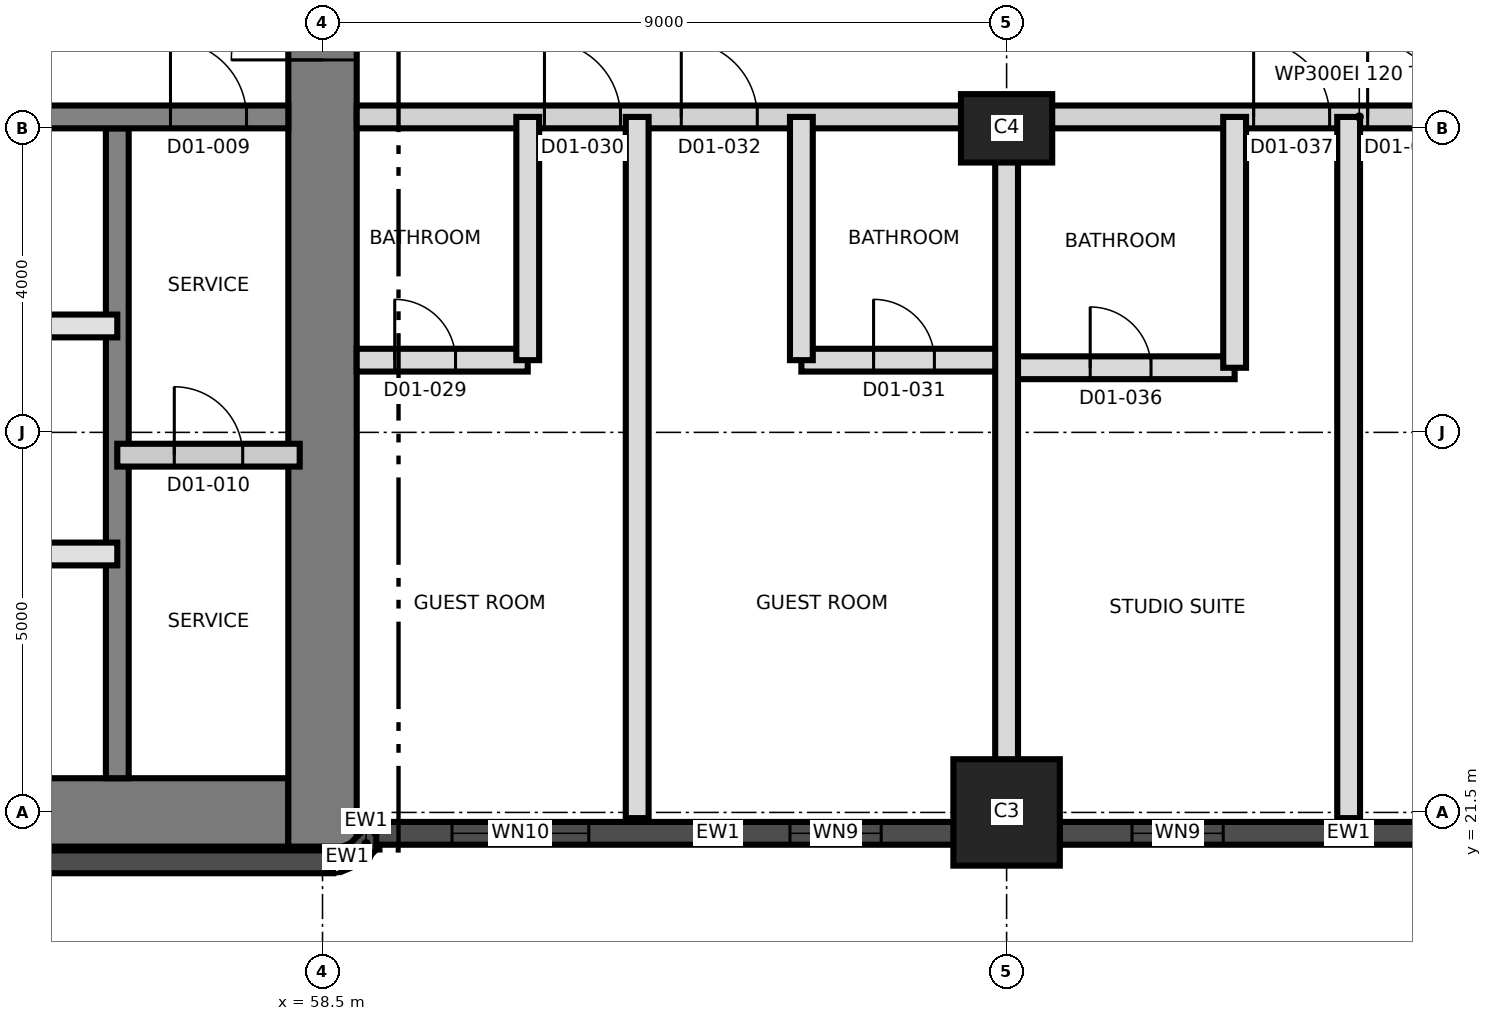
"""IFC4 building model, lengths in metres.
Left out: names, types, materials, properties, quantities, classifications, styles, units other than length and angle.
Written with IfcOpenShell. Run it as: python <this file> out.ifc"""

import sys

from ifc_helpers import new_model, si_unit, direction, frame, frame_2d, origin, origin_2d, place, context, subcontext, project, spatial, rectangle, extrude, element, fill, save


model = new_model("IFC4")
c1 = context("Model", 3, precision=1e-05, world=origin(), true_north=direction((0.0, 1.0)))
c2 = subcontext(c1, "Body", "Model", "MODEL_VIEW")
j1 = project(units=[si_unit("LENGTHUNIT", "METRE"), si_unit("PLANEANGLEUNIT", "RADIAN")], contexts=[c1])
p1 = place(None, origin())
s1 = spatial("IfcSite", under=j1, at=p1, CompositionType="ELEMENT")
p2 = place(p1, origin())
s2 = spatial("IfcBuilding", under=s1, at=p2, CompositionType="ELEMENT")
p3 = place(p2, frame((0.0, 0.0, 40.9)))
s3 = spatial("IfcBuildingStorey", under=s2, at=p3, CompositionType="ELEMENT", Elevation=40.9)
p4 = place(p3, frame((31.05, 21.5, 0.0), z_axis=(0.0, 0.0, 1.0), x_axis=(1.0, 0.0, 0.0)))
e1 = element("IfcWall", 1, at=p4, inside=s3, PredefinedType="SHEAR", context=c2, shape_type="SweptSolid", body=[
    extrude(rectangle(XDim=27.0, YDim=0.9, at=frame_2d((13.5, 0.0))), origin(), (0.0, 0.0, 1.0), 3.7),
])
p5 = place(p3, frame((58.5, 21.05, 0.0), z_axis=(0.0, 0.0, 1.0), x_axis=(0.0, 1.0, 0.0)))
e2 = element("IfcWall", 2, at=p5, inside=s3, PredefinedType="SHEAR", context=c2, shape_type="SweptSolid", body=[
    extrude(rectangle(XDim=18.9, YDim=0.9, at=frame_2d((9.45, 0.0))), origin(), (0.0, 0.0, 1.0), 3.7),
])
p6 = place(p5, frame((10.35, 0.0, 0.0)))
e3 = element("IfcOpeningElement", 3, at=p6, cuts=e2, PredefinedType="OPENING", context=c2, shape_type="SweptSolid", body=[
    extrude(rectangle(XDim=1.2, YDim=2.1, at=frame_2d((0.6, 1.05))), frame((0.0, 0.46, 0.0), z_axis=(0.0, -1.0, 0.0), x_axis=(1.0, 0.0, 0.0)), (0.0, 0.0, 1.0), 0.92),
])
p7 = place(p3, frame((55.8, 21.95, 0.0), z_axis=(0.0, 0.0, 1.0), x_axis=(0.0, 1.0, 0.0)))
e4 = element("IfcWall", 4, at=p7, inside=s3, PredefinedType="SHEAR", context=c2, shape_type="SweptSolid", body=[
    extrude(rectangle(XDim=8.55, YDim=0.3, at=frame_2d((4.275, 0.0))), origin(), (0.0, 0.0, 1.0), 3.7),
])
p8 = place(p3, frame((31.95, 30.65, 0.0), z_axis=(0.0, 0.0, 1.0), x_axis=(1.0, 0.0, 0.0)))
e5 = element("IfcWall", 5, at=p8, inside=s3, PredefinedType="SHEAR", context=c2, shape_type="SweptSolid", body=[
    extrude(rectangle(XDim=26.1, YDim=0.3, at=frame_2d((13.05, 0.0))), origin(), (0.0, 0.0, 1.0), 3.7),
])
p9 = place(p8, frame((24.55, 0.0, 0.0)))
e6 = element("IfcOpeningElement", 6, at=p9, cuts=e5, PredefinedType="OPENING", context=c2, shape_type="SweptSolid", body=[
    extrude(rectangle(XDim=1.0, YDim=2.1, at=frame_2d((0.5, 1.05))), frame((0.0, 0.16, 0.0), z_axis=(0.0, -1.0, 0.0), x_axis=(1.0, 0.0, 0.0)), (0.0, 0.0, 1.0), 0.32),
])
p10 = place(p8, frame((11.35, 0.0, 0.0)))
e7 = element("IfcOpeningElement", 7, at=p10, cuts=e5, PredefinedType="OPENING", context=c2, shape_type="SweptSolid", body=[
    extrude(rectangle(XDim=1.0, YDim=2.1, at=frame_2d((0.5, 1.05))), frame((0.0, 0.16, 0.0), z_axis=(0.0, -1.0, 0.0), x_axis=(1.0, 0.0, 0.0)), (0.0, 0.0, 1.0), 0.32),
])
p11 = place(p3, frame((67.5, 21.5, 0.0), z_axis=(0.0, 0.0, 1.0), x_axis=(1.0, 0.0, 0.0)))
e8 = element("IfcColumn", 8, at=p11, inside=s3, PredefinedType="COLUMN", context=c2, shape_type="SweptSolid", body=[
    extrude(rectangle(XDim=1.4, YDim=1.4, at=origin_2d()), origin(), (0.0, 0.0, 1.0), 3.7),
])
p12 = place(p3, frame((67.5, 30.5, 0.0), z_axis=(0.0, 0.0, 1.0), x_axis=(1.0, 0.0, 0.0)))
e9 = element("IfcColumn", 9, at=p12, inside=s3, PredefinedType="COLUMN", context=c2, shape_type="SweptSolid", body=[
    extrude(rectangle(XDim=1.2, YDim=0.9, at=origin_2d()), origin(), (0.0, 0.0, 1.0), 3.7),
])
p13 = place(p3, frame((31.36, 20.85, 0.0), z_axis=(0.0, 0.0, 1.0), x_axis=(1.0, 0.0, 0.0)))
e10 = element("IfcWall", 10, at=p13, inside=s3, PredefinedType="SOLIDWALL", context=c2, shape_type="SweptSolid", body=[
    extrude(rectangle(XDim=27.281, YDim=0.3, at=frame_2d((13.64, 0.0))), origin(), (0.0, 0.0, 1.0), 3.4),
])
p14 = place(p3, frame((58.698, 20.861, 0.0), z_axis=(0.0, 0.0, 1.0), x_axis=(0.923757413239, 0.38297812142, 0.0)))
e11 = element("IfcWall", 11, at=p14, inside=s3, PredefinedType="SOLIDWALL", context=c2, shape_type="SweptSolid", body=[
    extrude(rectangle(XDim=0.275, YDim=0.3, at=frame_2d((0.138, 0.0))), origin(), (0.0, 0.0, 1.0), 3.4),
])
p15 = place(p3, frame((58.952, 20.967, 0.0), z_axis=(0.0, 0.0, 1.0), x_axis=(0.702144810536, 0.712034174065, 0.0)))
e12 = element("IfcWall", 12, at=p15, inside=s3, PredefinedType="SOLIDWALL", context=c2, shape_type="SweptSolid", body=[
    extrude(rectangle(XDim=0.346, YDim=0.3, at=frame_2d((0.173, 0.0))), origin(), (0.0, 0.0, 1.0), 3.4),
])
p16 = place(p3, frame((59.207, 21.225, 0.0), z_axis=(0.0, 0.0, 1.0), x_axis=(1.0, 0.0, 0.0)))
e13 = element("IfcWall", 13, at=p16, inside=s3, PredefinedType="SOLIDWALL", context=c2, shape_type="SweptSolid", body=[
    extrude(rectangle(XDim=8.993, YDim=0.3, at=frame_2d((4.497, 0.0))), origin(), (0.0, 0.0, 1.0), 3.4),
])
p17 = place(p16, frame((0.997, 0.0, 0.3)))
e14 = element("IfcOpeningElement", 14, at=p17, cuts=e13, PredefinedType="OPENING", context=c2, shape_type="SweptSolid", body=[
    extrude(rectangle(XDim=1.8, YDim=2.4, at=frame_2d((0.9, 1.2))), frame((0.0, 0.16, 0.0), z_axis=(0.0, -1.0, 0.0), x_axis=(1.0, 0.0, 0.0)), (0.0, 0.0, 1.0), 0.32),
])
p18 = place(p16, frame((5.443, 0.0, 0.9)))
e15 = element("IfcOpeningElement", 15, at=p18, cuts=e13, PredefinedType="OPENING", context=c2, shape_type="SweptSolid", body=[
    extrude(rectangle(XDim=1.2, YDim=1.5, at=frame_2d((0.6, 0.75))), frame((0.0, 0.16, 0.0), z_axis=(0.0, -1.0, 0.0), x_axis=(1.0, 0.0, 0.0)), (0.0, 0.0, 1.0), 0.32),
])
p19 = place(p3, frame((68.2, 21.225, 0.0), z_axis=(0.0, 0.0, 1.0), x_axis=(1.0, 0.0, 0.0)))
e16 = element("IfcWall", 16, at=p19, inside=s3, PredefinedType="SOLIDWALL", context=c2, shape_type="SweptSolid", body=[
    extrude(rectangle(XDim=7.6, YDim=0.3, at=frame_2d((3.8, 0.0))), origin(), (0.0, 0.0, 1.0), 2.7),
])
p20 = place(p19, frame((0.95, 0.0, 0.9)))
e17 = element("IfcOpeningElement", 17, at=p20, cuts=e16, PredefinedType="OPENING", context=c2, shape_type="SweptSolid", body=[
    extrude(rectangle(XDim=1.2, YDim=1.5, at=frame_2d((0.6, 0.75))), frame((0.0, 0.16, 0.0), z_axis=(0.0, -1.0, 0.0), x_axis=(1.0, 0.0, 0.0)), (0.0, 0.0, 1.0), 0.32),
])
p21 = place(p19, frame((5.45, 0.0, 0.9)))
e18 = element("IfcOpeningElement", 18, at=p21, cuts=e16, PredefinedType="OPENING", context=c2, shape_type="SweptSolid", body=[
    extrude(rectangle(XDim=1.2, YDim=1.5, at=frame_2d((0.6, 0.75))), frame((0.0, 0.16, 0.0), z_axis=(0.0, -1.0, 0.0), x_axis=(1.0, 0.0, 0.0)), (0.0, 0.0, 1.0), 0.32),
])
p22 = place(p3, frame((46.8, 24.9, 0.0), z_axis=(0.0, 0.0, 1.0), x_axis=(1.0, 0.0, 0.0)))
e19 = element("IfcWall", 19, at=p22, inside=s3, PredefinedType="SOLIDWALL", context=c2, shape_type="SweptSolid", body=[
    extrude(rectangle(XDim=9.0, YDim=0.3, at=frame_2d((4.5, 0.0))), origin(), (0.0, 0.0, 1.0), 3.4),
])
p23 = place(p22, frame((1.05, 0.0, 0.0)))
e20 = element("IfcOpeningElement", 20, at=p23, cuts=e19, PredefinedType="OPENING", context=c2, shape_type="SweptSolid", body=[
    extrude(rectangle(XDim=0.9, YDim=2.1, at=frame_2d((0.45, 1.05))), frame((0.0, 0.16, 0.0), z_axis=(0.0, -1.0, 0.0), x_axis=(1.0, 0.0, 0.0)), (0.0, 0.0, 1.0), 0.32),
])
p24 = place(p3, frame((55.8, 26.2, 0.0), z_axis=(0.0, 0.0, 1.0), x_axis=(1.0, 0.0, 0.0)))
e21 = element("IfcWall", 21, at=p24, inside=s3, PredefinedType="PARTITIONING", context=c2, shape_type="SweptSolid", body=[
    extrude(rectangle(XDim=2.4, YDim=0.3, at=frame_2d((1.2, 0.0))), origin(), (0.0, 0.0, 1.0), 3.4),
])
p25 = place(p24, frame((0.75, 0.0, 0.0)))
e22 = element("IfcOpeningElement", 22, at=p25, cuts=e21, PredefinedType="OPENING", context=c2, shape_type="SweptSolid", body=[
    extrude(rectangle(XDim=0.9, YDim=2.1, at=frame_2d((0.45, 1.05))), frame((0.0, 0.16, 0.0), z_axis=(0.0, -1.0, 0.0), x_axis=(1.0, 0.0, 0.0)), (0.0, 0.0, 1.0), 0.32),
])
p26 = place(p3, frame((49.8, 27.9, 0.0), z_axis=(0.0, 0.0, 1.0), x_axis=(1.0, 0.0, 0.0)))
e23 = element("IfcWall", 23, at=p26, inside=s3, PredefinedType="SOLIDWALL", context=c2, shape_type="SweptSolid", body=[
    extrude(rectangle(XDim=6.0, YDim=0.3, at=frame_2d((3.0, 0.0))), origin(), (0.0, 0.0, 1.0), 3.4),
])
p27 = place(p3, frame((67.5, 27.35, 0.0), z_axis=(0.0, 0.0, 1.0), x_axis=(1.0, 0.0, 0.0)))
e24 = element("IfcWall", 24, at=p27, inside=s3, PredefinedType="PARTITIONING", context=c2, shape_type="SweptSolid", body=[
    extrude(rectangle(XDim=3.0, YDim=0.3, at=frame_2d((1.5, 0.0))), origin(), (0.0, 0.0, 1.0), 3.4),
])
p28 = place(p27, frame((1.1, 0.0, 0.0)))
e25 = element("IfcOpeningElement", 25, at=p28, cuts=e24, PredefinedType="OPENING", context=c2, shape_type="SweptSolid", body=[
    extrude(rectangle(XDim=0.8, YDim=2.1, at=frame_2d((0.4, 1.05))), frame((0.0, 0.16, 0.0), z_axis=(0.0, -1.0, 0.0), x_axis=(1.0, 0.0, 0.0)), (0.0, 0.0, 1.0), 0.32),
])
p29 = place(p3, frame((58.95, 27.45, 0.0), z_axis=(0.0, 0.0, 1.0), x_axis=(1.0, 0.0, 0.0)))
e26 = element("IfcWall", 26, at=p29, inside=s3, PredefinedType="PARTITIONING", context=c2, shape_type="SweptSolid", body=[
    extrude(rectangle(XDim=2.25, YDim=0.3, at=frame_2d((1.125, 0.0))), origin(), (0.0, 0.0, 1.0), 3.4),
])
p30 = place(p29, frame((0.5, 0.0, 0.0)))
e27 = element("IfcOpeningElement", 27, at=p30, cuts=e26, PredefinedType="OPENING", context=c2, shape_type="SweptSolid", body=[
    extrude(rectangle(XDim=0.8, YDim=2.1, at=frame_2d((0.4, 1.05))), frame((0.0, 0.16, 0.0), z_axis=(0.0, -1.0, 0.0), x_axis=(1.0, 0.0, 0.0)), (0.0, 0.0, 1.0), 0.32),
])
p31 = place(p3, frame((64.8, 27.45, 0.0), z_axis=(0.0, 0.0, 1.0), x_axis=(1.0, 0.0, 0.0)))
e28 = element("IfcWall", 28, at=p31, inside=s3, PredefinedType="PARTITIONING", context=c2, shape_type="SweptSolid", body=[
    extrude(rectangle(XDim=2.7, YDim=0.3, at=frame_2d((1.35, 0.0))), origin(), (0.0, 0.0, 1.0), 3.4),
])
p32 = place(p31, frame((0.95, 0.0, 0.0)))
e29 = element("IfcOpeningElement", 29, at=p32, cuts=e28, PredefinedType="OPENING", context=c2, shape_type="SweptSolid", body=[
    extrude(rectangle(XDim=0.8, YDim=2.1, at=frame_2d((0.4, 1.05))), frame((0.0, 0.16, 0.0), z_axis=(0.0, -1.0, 0.0), x_axis=(1.0, 0.0, 0.0)), (0.0, 0.0, 1.0), 0.32),
])
p33 = place(p3, frame((58.95, 30.65, 0.0), z_axis=(0.0, 0.0, 1.0), x_axis=(1.0, 0.0, 0.0)))
e30 = element("IfcWall", 30, at=p33, inside=s3, PredefinedType="PARTITIONING", context=c2, shape_type="SweptSolid", body=[
    extrude(rectangle(XDim=26.38, YDim=0.3, at=frame_2d((13.19, 0.0))), origin(), (0.0, 0.0, 1.0), 3.4),
])
p34 = place(p33, frame((2.47, 0.0, 0.0)))
e31 = element("IfcOpeningElement", 31, at=p34, cuts=e30, PredefinedType="OPENING", context=c2, shape_type="SweptSolid", body=[
    extrude(rectangle(XDim=1.0, YDim=2.1, at=frame_2d((0.5, 1.05))), frame((0.0, 0.16, 0.0), z_axis=(0.0, -1.0, 0.0), x_axis=(1.0, 0.0, 0.0)), (0.0, 0.0, 1.0), 0.32),
])
p35 = place(p33, frame((4.27, 0.0, 0.0)))
e32 = element("IfcOpeningElement", 32, at=p35, cuts=e30, PredefinedType="OPENING", context=c2, shape_type="SweptSolid", body=[
    extrude(rectangle(XDim=1.0, YDim=2.1, at=frame_2d((0.5, 1.05))), frame((0.0, 0.16, 0.0), z_axis=(0.0, -1.0, 0.0), x_axis=(1.0, 0.0, 0.0)), (0.0, 0.0, 1.0), 0.32),
])
p36 = place(p33, frame((11.8, 0.0, 0.0)))
e33 = element("IfcOpeningElement", 33, at=p36, cuts=e30, PredefinedType="OPENING", context=c2, shape_type="SweptSolid", body=[
    extrude(rectangle(XDim=1.0, YDim=2.4, at=frame_2d((0.5, 1.2))), frame((0.0, 0.16, 0.0), z_axis=(0.0, -1.0, 0.0), x_axis=(1.0, 0.0, 0.0)), (0.0, 0.0, 1.0), 0.32),
])
p37 = place(p33, frame((13.3, 0.0, 0.0)))
e34 = element("IfcOpeningElement", 34, at=p37, cuts=e30, PredefinedType="OPENING", context=c2, shape_type="SweptSolid", body=[
    extrude(rectangle(XDim=1.0, YDim=2.4, at=frame_2d((0.5, 1.2))), frame((0.0, 0.16, 0.0), z_axis=(0.0, -1.0, 0.0), x_axis=(1.0, 0.0, 0.0)), (0.0, 0.0, 1.0), 0.32),
])
p38 = place(p33, frame((18.685, 0.0, 0.0)))
e35 = element("IfcOpeningElement", 35, at=p38, cuts=e30, PredefinedType="OPENING", context=c2, shape_type="SweptSolid", body=[
    extrude(rectangle(XDim=1.2, YDim=2.1, at=frame_2d((0.6, 1.05))), frame((0.0, 0.16, 0.0), z_axis=(0.0, -1.0, 0.0), x_axis=(1.0, 0.0, 0.0)), (0.0, 0.0, 1.0), 0.32),
])
p39 = place(p33, frame((21.935, 0.0, 0.0)))
e36 = element("IfcOpeningElement", 36, at=p39, cuts=e30, PredefinedType="OPENING", context=c2, shape_type="SweptSolid", body=[
    extrude(rectangle(XDim=1.0, YDim=2.1, at=frame_2d((0.5, 1.05))), frame((0.0, 0.16, 0.0), z_axis=(0.0, -1.0, 0.0), x_axis=(1.0, 0.0, 0.0)), (0.0, 0.0, 1.0), 0.32),
])
p40 = place(p3, frame((61.2, 27.45, 0.0), z_axis=(0.0, 0.0, 1.0), x_axis=(0.0, 1.0, 0.0)))
e37 = element("IfcWall", 37, at=p40, inside=s3, PredefinedType="PARTITIONING", context=c2, shape_type="SweptSolid", body=[
    extrude(rectangle(XDim=3.2, YDim=0.3, at=frame_2d((1.6, 0.0))), origin(), (0.0, 0.0, 1.0), 3.4),
])
p41 = place(p3, frame((62.64, 21.425, 0.0), z_axis=(0.0, 0.0, 1.0), x_axis=(0.0, 1.0, 0.0)))
e38 = element("IfcWall", 38, at=p41, inside=s3, PredefinedType="PARTITIONING", context=c2, shape_type="SweptSolid", body=[
    extrude(rectangle(XDim=9.225, YDim=0.3, at=frame_2d((4.612, 0.0))), origin(), (0.0, 0.0, 1.0), 3.4),
])
p42 = place(p3, frame((64.8, 27.45, 0.0), z_axis=(0.0, 0.0, 1.0), x_axis=(0.0, 1.0, 0.0)))
e39 = element("IfcWall", 39, at=p42, inside=s3, PredefinedType="PARTITIONING", context=c2, shape_type="SweptSolid", body=[
    extrude(rectangle(XDim=3.2, YDim=0.3, at=frame_2d((1.6, 0.0))), origin(), (0.0, 0.0, 1.0), 3.4),
])
p43 = place(p3, frame((67.5, 21.425, 0.0), z_axis=(0.0, 0.0, 1.0), x_axis=(0.0, 1.0, 0.0)))
e40 = element("IfcWall", 40, at=p43, inside=s3, PredefinedType="PARTITIONING", context=c2, shape_type="SweptSolid", body=[
    extrude(rectangle(XDim=9.225, YDim=0.3, at=frame_2d((4.612, 0.0))), origin(), (0.0, 0.0, 1.0), 3.4),
])
p44 = place(p3, frame((70.5, 27.35, 0.0), z_axis=(0.0, 0.0, 1.0), x_axis=(0.0, 1.0, 0.0)))
e41 = element("IfcWall", 41, at=p44, inside=s3, PredefinedType="PARTITIONING", context=c2, shape_type="SweptSolid", body=[
    extrude(rectangle(XDim=3.3, YDim=0.3, at=frame_2d((1.65, 0.0))), origin(), (0.0, 0.0, 1.0), 3.4),
])
p45 = place(p3, frame((72.0, 21.425, 0.0), z_axis=(0.0, 0.0, 1.0), x_axis=(0.0, 1.0, 0.0)))
e42 = element("IfcWall", 42, at=p45, inside=s3, PredefinedType="PARTITIONING", context=c2, shape_type="SweptSolid", body=[
    extrude(rectangle(XDim=9.225, YDim=0.3, at=frame_2d((4.612, 0.0))), origin(), (0.0, 0.0, 1.0), 3.4),
])
p46 = place(p17, origin())
e43 = element("IfcWindow", 43, at=p46, inside=s3, PartitioningType="SINGLE_PANEL", PredefinedType="WINDOW", context=c2, shape_type="SweptSolid", body=[
    extrude(rectangle(XDim=1.8, YDim=2.4, at=frame_2d((0.9, 1.2))), frame((0.0, 0.03, 0.0), z_axis=(0.0, -1.0, 0.0), x_axis=(1.0, 0.0, 0.0)), (0.0, 0.0, 1.0), 0.06),
])
fill(e14, e43)
p47 = place(p18, origin())
e44 = element("IfcWindow", 44, at=p47, inside=s3, PartitioningType="SINGLE_PANEL", PredefinedType="WINDOW", context=c2, shape_type="SweptSolid", body=[
    extrude(rectangle(XDim=1.2, YDim=1.5, at=frame_2d((0.6, 0.75))), frame((0.0, 0.03, 0.0), z_axis=(0.0, -1.0, 0.0), x_axis=(1.0, 0.0, 0.0)), (0.0, 0.0, 1.0), 0.06),
])
fill(e15, e44)
p48 = place(p20, origin())
e45 = element("IfcWindow", 45, at=p48, inside=s3, PartitioningType="SINGLE_PANEL", PredefinedType="WINDOW", context=c2, shape_type="SweptSolid", body=[
    extrude(rectangle(XDim=1.2, YDim=1.5, at=frame_2d((0.6, 0.75))), frame((0.0, 0.03, 0.0), z_axis=(0.0, -1.0, 0.0), x_axis=(1.0, 0.0, 0.0)), (0.0, 0.0, 1.0), 0.06),
])
fill(e17, e45)
p49 = place(p9, origin())
e46 = element("IfcDoor", 46, at=p49, inside=s3, OperationType="SINGLE_SWING_LEFT", PredefinedType="DOOR", context=c2, shape_type="SweptSolid", body=[
    extrude(rectangle(XDim=1.0, YDim=2.1, at=frame_2d((0.5, 1.05))), frame((0.0, 0.025, 0.0), z_axis=(0.0, -1.0, 0.0), x_axis=(1.0, 0.0, 0.0)), (0.0, 0.0, 1.0), 0.05),
])
fill(e6, e46)
p50 = place(p25, origin())
e47 = element("IfcDoor", 47, at=p50, inside=s3, OperationType="SINGLE_SWING_RIGHT", PredefinedType="DOOR", context=c2, shape_type="SweptSolid", body=[
    extrude(rectangle(XDim=0.9, YDim=2.1, at=frame_2d((0.45, 1.05))), frame((0.0, 0.025, 0.0), z_axis=(0.0, -1.0, 0.0), x_axis=(1.0, 0.0, 0.0)), (0.0, 0.0, 1.0), 0.05),
])
fill(e22, e47)
p51 = place(p6, origin())
e48 = element("IfcDoor", 48, at=p51, inside=s3, OperationType="SINGLE_SWING_LEFT", PredefinedType="DOOR", context=c2, shape_type="SweptSolid", body=[
    extrude(rectangle(XDim=1.2, YDim=2.1, at=frame_2d((0.6, 1.05))), frame((0.0, 0.025, 0.0), z_axis=(0.0, -1.0, 0.0), x_axis=(1.0, 0.0, 0.0)), (0.0, 0.0, 1.0), 0.05),
])
fill(e3, e48)
p52 = place(p30, origin())
e49 = element("IfcDoor", 49, at=p52, inside=s3, OperationType="SINGLE_SWING_LEFT", PredefinedType="DOOR", context=c2, shape_type="SweptSolid", body=[
    extrude(rectangle(XDim=0.8, YDim=2.1, at=frame_2d((0.4, 1.05))), frame((0.0, 0.025, 0.0), z_axis=(0.0, -1.0, 0.0), x_axis=(1.0, 0.0, 0.0)), (0.0, 0.0, 1.0), 0.05),
])
fill(e27, e49)
p53 = place(p34, origin())
e50 = element("IfcDoor", 50, at=p53, inside=s3, OperationType="SINGLE_SWING_RIGHT", PredefinedType="DOOR", context=c2, shape_type="SweptSolid", body=[
    extrude(rectangle(XDim=1.0, YDim=2.1, at=frame_2d((0.5, 1.05))), frame((0.0, 0.025, 0.0), z_axis=(0.0, -1.0, 0.0), x_axis=(1.0, 0.0, 0.0)), (0.0, 0.0, 1.0), 0.05),
])
fill(e31, e50)
p54 = place(p32, origin())
e51 = element("IfcDoor", 51, at=p54, inside=s3, OperationType="SINGLE_SWING_RIGHT", PredefinedType="DOOR", context=c2, shape_type="SweptSolid", body=[
    extrude(rectangle(XDim=0.8, YDim=2.1, at=frame_2d((0.4, 1.05))), frame((0.0, 0.025, 0.0), z_axis=(0.0, -1.0, 0.0), x_axis=(1.0, 0.0, 0.0)), (0.0, 0.0, 1.0), 0.05),
])
fill(e29, e51)
p55 = place(p35, origin())
e52 = element("IfcDoor", 52, at=p55, inside=s3, OperationType="SINGLE_SWING_LEFT", PredefinedType="DOOR", context=c2, shape_type="SweptSolid", body=[
    extrude(rectangle(XDim=1.0, YDim=2.1, at=frame_2d((0.5, 1.05))), frame((0.0, 0.025, 0.0), z_axis=(0.0, -1.0, 0.0), x_axis=(1.0, 0.0, 0.0)), (0.0, 0.0, 1.0), 0.05),
])
fill(e32, e52)
p56 = place(p28, origin())
e53 = element("IfcDoor", 53, at=p56, inside=s3, OperationType="SINGLE_SWING_LEFT", PredefinedType="DOOR", context=c2, shape_type="SweptSolid", body=[
    extrude(rectangle(XDim=0.8, YDim=2.1, at=frame_2d((0.4, 1.05))), frame((0.0, 0.025, 0.0), z_axis=(0.0, -1.0, 0.0), x_axis=(1.0, 0.0, 0.0)), (0.0, 0.0, 1.0), 0.05),
])
fill(e25, e53)
p57 = place(p36, origin())
e54 = element("IfcDoor", 54, at=p57, inside=s3, OperationType="SINGLE_SWING_LEFT", PredefinedType="DOOR", context=c2, shape_type="SweptSolid", body=[
    extrude(rectangle(XDim=1.0, YDim=2.4, at=frame_2d((0.5, 1.2))), frame((0.0, 0.025, 0.0), z_axis=(0.0, -1.0, 0.0), x_axis=(1.0, 0.0, 0.0)), (0.0, 0.0, 1.0), 0.05),
])
fill(e33, e54)
p58 = place(p37, origin())
e55 = element("IfcDoor", 55, at=p58, inside=s3, OperationType="SINGLE_SWING_RIGHT", PredefinedType="DOOR", context=c2, shape_type="SweptSolid", body=[
    extrude(rectangle(XDim=1.0, YDim=2.4, at=frame_2d((0.5, 1.2))), frame((0.0, 0.025, 0.0), z_axis=(0.0, -1.0, 0.0), x_axis=(1.0, 0.0, 0.0)), (0.0, 0.0, 1.0), 0.05),
])
fill(e34, e55)
save(model, sys.argv[1])
